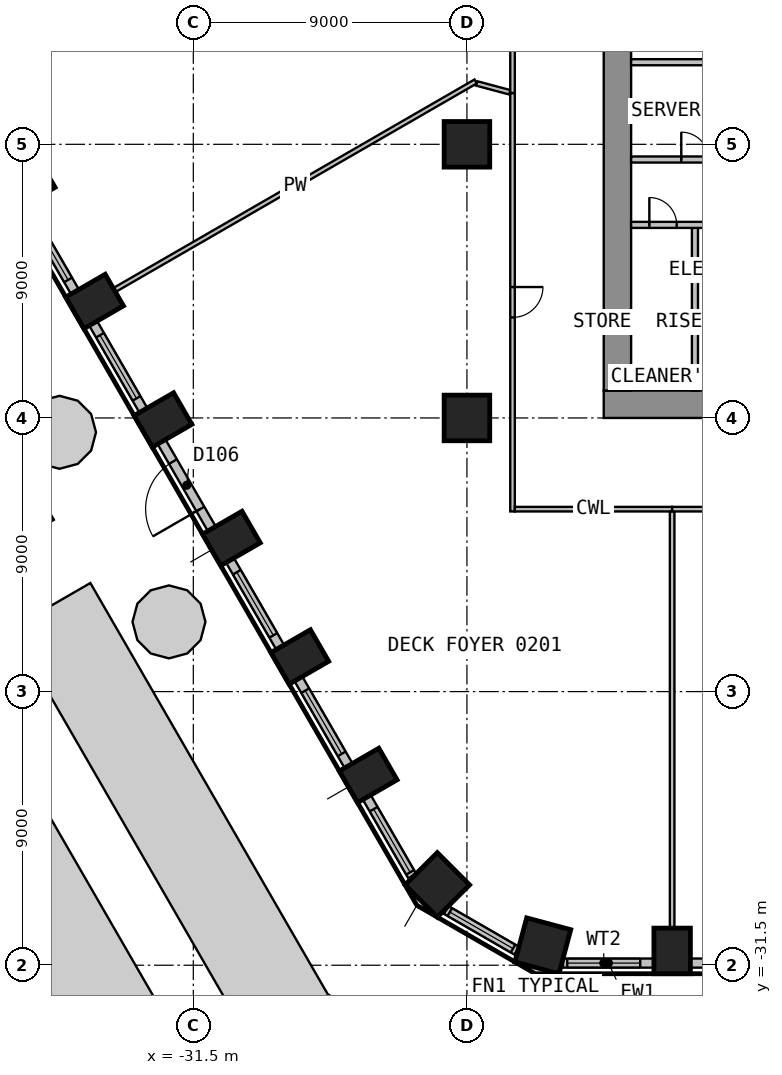
"""IFC4 building model, lengths in metres.
Left out: names, types, materials, properties, quantities, classifications, styles, units other than length and angle.
Written with IfcOpenShell. Run it as: python <this file> out.ifc"""

import sys

from ifc_helpers import new_model, si_unit, direction, frame, frame_2d, origin, origin_2d, place, context, subcontext, project, spatial, polyline, rectangle, circle, outline, extrude, element, fill, save


model = new_model("IFC4")
c1 = context("Model", 3, precision=1e-05, world=origin(), true_north=direction((0.0, 1.0)))
c2 = subcontext(c1, "Body", "Model", "MODEL_VIEW")
j1 = project(units=[si_unit("LENGTHUNIT", "METRE"), si_unit("PLANEANGLEUNIT", "RADIAN")], contexts=[c1])
p1 = place(None, origin())
s1 = spatial("IfcSite", under=j1, at=p1, CompositionType="ELEMENT")
p2 = place(p1, origin())
s2 = spatial("IfcBuilding", under=s1, at=p2, CompositionType="ELEMENT")
p3 = place(p2, frame((0.0, 0.0, 10.8)))
s3 = spatial("IfcBuildingStorey", under=s2, at=p3, CompositionType="ELEMENT", Elevation=10.8)
p4 = place(p3, frame((-20.004, -30.861, 0.0), z_axis=(0.0, 0.0, 1.0), x_axis=(0.965925826289, -0.258819045103, 0.0)))
e1 = element("IfcColumn", 1, at=p4, inside=s3, PredefinedType="COLUMN", context=c2, shape_type="SweptSolid", body=[
    extrude(rectangle(XDim=1.5, YDim=1.5, at=origin_2d()), origin(), (0.0, 0.0, 1.0), 4.4),
])
for number, where, z_axis, x_axis in (
    (2, (-15.75, -31.03, 0.0), (0.0, 0.0, 1.0), (1.0, 0.0, 0.0)),
    (3, (-36.998, -5.772, 0.0), (0.0, 0.0, 1.0), (0.5, -0.866, 0.0)),
    (4, (-34.748, -9.669, 0.0), (0.0, 0.0, 1.0), (0.5, -0.866, 0.0)),
    (5, (-32.498, -13.566, 0.0), (0.0, 0.0, 1.0), (0.5, -0.866, 0.0)),
    (6, (-30.248, -17.463, 0.0), (0.0, 0.0, 1.0), (0.5, -0.866, 0.0)),
    (7, (-27.998, -21.361, 0.0), (0.0, 0.0, 1.0), (0.5, -0.866, 0.0)),
    (8, (-25.748, -25.258, 0.0), (0.0, 0.0, 1.0), (0.5, -0.866, 0.0)),
):
    element("IfcColumn", number, at=place(p3, frame(where, z_axis=z_axis, x_axis=x_axis)), inside=s3, PredefinedType="COLUMN", context=c2, shape_type="SweptSolid", body=[
        extrude(rectangle(XDim=1.2, YDim=1.5, at=origin_2d()), origin(), (0.0, 0.0, 1.0), 4.4),
    ])
p5 = place(p3, frame((-23.475, -28.857, 0.0), z_axis=(0.0, 0.0, 1.0), x_axis=(0.707106781187, -0.707106781187, 0.0)))
e9 = element("IfcColumn", 9, at=p5, inside=s3, PredefinedType="COLUMN", context=c2, shape_type="SweptSolid", body=[
    extrude(rectangle(XDim=1.5, YDim=1.5, at=origin_2d()), origin(), (0.0, 0.0, 1.0), 4.4),
])
for number, where, z_axis, x_axis in (
    (10, (-22.5, -13.5, 0.0), (0.0, 0.0, 1.0), (1.0, 0.0, 0.0)),
    (11, (-22.5, -4.5, 0.0), (0.0, 0.0, 1.0), (1.0, 0.0, 0.0)),
):
    element("IfcColumn", number, at=place(p3, frame(where, z_axis=z_axis, x_axis=x_axis)), inside=s3, PredefinedType="COLUMN", context=c2, shape_type="SweptSolid", body=[
        extrude(circle(Radius=0.75, at=origin_2d()), origin(), (0.0, 0.0, 1.0), 4.4),
    ])
p6 = place(p3, frame((-19.339, -31.43, 0.0), z_axis=(0.0, 0.0, 1.0), x_axis=(1.0, 0.0, 0.0)))
e12 = element("IfcWall", 12, at=p6, inside=s3, PredefinedType="SOLIDWALL", context=c2, shape_type="SweptSolid", body=[
    extrude(rectangle(XDim=2.989, YDim=0.3, at=frame_2d((1.494, 0.0))), origin(), (0.0, 0.0, 1.0), 4.4),
])
p7 = place(p6, frame((0.139, 0.0, 0.9)))
e13 = element("IfcOpeningElement", 13, at=p7, cuts=e12, PredefinedType="OPENING", context=c2, shape_type="SweptSolid", body=[
    extrude(rectangle(XDim=2.4, YDim=3.0, at=frame_2d((1.2, 1.5))), frame((0.0, 0.16, 0.0), z_axis=(0.0, -1.0, 0.0), x_axis=(1.0, 0.0, 0.0)), (0.0, 0.0, 1.0), 0.32),
])
p8 = place(p3, frame((-15.149, -31.43, 0.0), z_axis=(0.0, 0.0, 1.0), x_axis=(1.0, 0.0, 0.0)))
e14 = element("IfcWall", 14, at=p8, inside=s3, PredefinedType="SOLIDWALL", context=c2, shape_type="SweptSolid", body=[
    extrude(rectangle(XDim=3.299, YDim=0.3, at=frame_2d((1.649, 0.0))), origin(), (0.0, 0.0, 1.0), 4.4),
])
p9 = place(p8, frame((0.449, 0.0, 0.9)))
e15 = element("IfcOpeningElement", 15, at=p9, cuts=e14, PredefinedType="OPENING", context=c2, shape_type="SweptSolid", body=[
    extrude(rectangle(XDim=2.4, YDim=3.0, at=frame_2d((1.2, 1.5))), frame((0.0, 0.16, 0.0), z_axis=(0.0, -1.0, 0.0), x_axis=(1.0, 0.0, 0.0)), (0.0, 0.0, 1.0), 0.32),
])
p10 = place(p3, frame((-37.044, -6.492, 0.0), z_axis=(0.0, 0.0, 1.0), x_axis=(0.499991515992, -0.866030301974, 0.0)))
e16 = element("IfcWall", 16, at=p10, inside=s3, PredefinedType="SOLIDWALL", context=c2, shape_type="SweptSolid", body=[
    extrude(rectangle(XDim=3.299, YDim=0.3, at=frame_2d((1.649, 0.0))), origin(), (0.0, 0.0, 1.0), 4.4),
])
p11 = place(p10, frame((0.449, 0.0, 0.9)))
e17 = element("IfcOpeningElement", 17, at=p11, cuts=e16, PredefinedType="OPENING", context=c2, shape_type="SweptSolid", body=[
    extrude(rectangle(XDim=2.4, YDim=3.0, at=frame_2d((1.2, 1.5))), frame((0.0, 0.16, 0.0), z_axis=(0.0, -1.0, 0.0), x_axis=(1.0, 0.0, 0.0)), (0.0, 0.0, 1.0), 0.32),
])
p12 = place(p3, frame((-34.794, -10.389, 0.0), z_axis=(0.0, 0.0, 1.0), x_axis=(0.499991515992, -0.866030301974, 0.0)))
e18 = element("IfcWall", 18, at=p12, inside=s3, PredefinedType="SOLIDWALL", context=c2, shape_type="SweptSolid", body=[
    extrude(rectangle(XDim=3.299, YDim=0.3, at=frame_2d((1.649, 0.0))), origin(), (0.0, 0.0, 1.0), 4.4),
])
p13 = place(p12, frame((0.449, 0.0, 0.9)))
e19 = element("IfcOpeningElement", 19, at=p13, cuts=e18, PredefinedType="OPENING", context=c2, shape_type="SweptSolid", body=[
    extrude(rectangle(XDim=2.4, YDim=3.0, at=frame_2d((1.2, 1.5))), frame((0.0, 0.16, 0.0), z_axis=(0.0, -1.0, 0.0), x_axis=(1.0, 0.0, 0.0)), (0.0, 0.0, 1.0), 0.32),
])
p14 = place(p3, frame((-30.894, -17.143, 0.0), z_axis=(0.0, 0.0, 1.0), x_axis=(-0.499991515992, 0.866030301974, 0.0)))
e20 = element("IfcWall", 20, at=p14, inside=s3, PredefinedType="SOLIDWALL", context=c2, shape_type="SweptSolid", body=[
    extrude(rectangle(XDim=3.299, YDim=0.3, at=frame_2d((1.649, 0.0))), origin(), (0.0, 0.0, 1.0), 4.4),
])
p15 = place(p14, frame((0.75, 0.0, 0.0)))
e21 = element("IfcOpeningElement", 21, at=p15, cuts=e20, PredefinedType="OPENING", context=c2, shape_type="SweptSolid", body=[
    extrude(rectangle(XDim=1.8, YDim=2.4, at=frame_2d((0.9, 1.2))), frame((0.0, 0.16, 0.0), z_axis=(0.0, -1.0, 0.0), x_axis=(1.0, 0.0, 0.0)), (0.0, 0.0, 1.0), 0.32),
])
p16 = place(p3, frame((-30.294, -18.184, 0.0), z_axis=(0.0, 0.0, 1.0), x_axis=(0.499991515992, -0.866030301974, 0.0)))
e22 = element("IfcWall", 22, at=p16, inside=s3, PredefinedType="SOLIDWALL", context=c2, shape_type="SweptSolid", body=[
    extrude(rectangle(XDim=3.299, YDim=0.3, at=frame_2d((1.649, 0.0))), origin(), (0.0, 0.0, 1.0), 4.4),
])
p17 = place(p16, frame((0.449, 0.0, 0.9)))
e23 = element("IfcOpeningElement", 23, at=p17, cuts=e22, PredefinedType="OPENING", context=c2, shape_type="SweptSolid", body=[
    extrude(rectangle(XDim=2.4, YDim=3.0, at=frame_2d((1.2, 1.5))), frame((0.0, 0.16, 0.0), z_axis=(0.0, -1.0, 0.0), x_axis=(1.0, 0.0, 0.0)), (0.0, 0.0, 1.0), 0.32),
])
p18 = place(p3, frame((-28.044, -22.081, 0.0), z_axis=(0.0, 0.0, 1.0), x_axis=(0.499991515992, -0.866030301974, 0.0)))
e24 = element("IfcWall", 24, at=p18, inside=s3, PredefinedType="SOLIDWALL", context=c2, shape_type="SweptSolid", body=[
    extrude(rectangle(XDim=3.299, YDim=0.3, at=frame_2d((1.649, 0.0))), origin(), (0.0, 0.0, 1.0), 4.4),
])
p19 = place(p18, frame((0.449, 0.0, 0.9)))
e25 = element("IfcOpeningElement", 25, at=p19, cuts=e24, PredefinedType="OPENING", context=c2, shape_type="SweptSolid", body=[
    extrude(rectangle(XDim=2.4, YDim=3.0, at=frame_2d((1.2, 1.5))), frame((0.0, 0.16, 0.0), z_axis=(0.0, -1.0, 0.0), x_axis=(1.0, 0.0, 0.0)), (0.0, 0.0, 1.0), 0.32),
])
p20 = place(p3, frame((-25.794, -25.978, 0.0), z_axis=(0.0, 0.0, 1.0), x_axis=(0.49999586137, -0.866027793211, 0.0)))
e26 = element("IfcWall", 26, at=p20, inside=s3, PredefinedType="SOLIDWALL", context=c2, shape_type="SweptSolid", body=[
    extrude(rectangle(XDim=2.989, YDim=0.3, at=frame_2d((1.494, 0.0))), origin(), (0.0, 0.0, 1.0), 4.4),
])
p21 = place(p20, frame((0.449, 0.0, 0.9)))
e27 = element("IfcOpeningElement", 27, at=p21, cuts=e26, PredefinedType="OPENING", context=c2, shape_type="SweptSolid", body=[
    extrude(rectangle(XDim=2.4, YDim=3.0, at=frame_2d((1.2, 1.5))), frame((0.0, 0.16, 0.0), z_axis=(0.0, -1.0, 0.0), x_axis=(1.0, 0.0, 0.0)), (0.0, 0.0, 1.0), 0.32),
])
p22 = place(p3, frame((-23.183, -29.682, 0.0), z_axis=(0.0, 0.0, 1.0), x_axis=(0.866001915448, -0.500040680786, 0.0)))
e28 = element("IfcWall", 28, at=p22, inside=s3, PredefinedType="SOLIDWALL", context=c2, shape_type="SweptSolid", body=[
    extrude(rectangle(XDim=2.678, YDim=0.3, at=frame_2d((1.339, 0.0))), origin(), (0.0, 0.0, 1.0), 4.4),
])
p23 = place(p22, frame((0.139, 0.0, 0.9)))
e29 = element("IfcOpeningElement", 29, at=p23, cuts=e28, PredefinedType="OPENING", context=c2, shape_type="SweptSolid", body=[
    extrude(rectangle(XDim=2.4, YDim=3.0, at=frame_2d((1.2, 1.5))), frame((0.0, 0.16, 0.0), z_axis=(0.0, -1.0, 0.0), x_axis=(1.0, 0.0, 0.0)), (0.0, 0.0, 1.0), 0.32),
])
p24 = place(p3, origin())
e30 = element("IfcWall", 30, at=p24, inside=s3, PredefinedType="SOLIDWALL", context=c2, shape_type="SweptSolid", body=[
    extrude(outline(polyline([(-12.4, -44.78), (-12.4, -40.78), (-22.662, -40.78), (-30.736, -36.118), (-39.216, -21.429), (-42.68, -23.429), (-33.664, -39.046), (-23.733, -44.78), (-12.4, -44.78)])), origin(), (0.0, 0.0, 1.0), 0.9),
])
p25 = place(p3, origin())
e31 = element("IfcWall", 31, at=p25, inside=s3, PredefinedType="SOLIDWALL", context=c2, shape_type="SweptSolid", body=[
    extrude(outline(polyline([(-12.4, -38.78), (-12.4, -35.78), (-21.322, -35.78), (-27.075, -32.458), (-34.886, -18.929), (-37.484, -20.429), (-29.271, -34.654), (-22.125, -38.78), (-12.4, -38.78)])), origin(), (0.0, 0.0, 1.0), 0.9),
])
p26 = place(p3, origin())
e32 = element("IfcWall", 32, at=p26, inside=s3, PredefinedType="SOLIDWALL", context=c2, shape_type="SweptSolid", body=[
    extrude(outline(polyline([(-46.897, -4.125), (-38.684, -18.351), (-36.086, -16.851), (-43.897, -3.322), (-43.897, 3.322), (-36.086, 16.851), (-38.684, 18.351), (-46.897, 4.125), (-46.897, -4.125)])), origin(), (0.0, 0.0, 1.0), 0.9),
])
p27 = place(p3, origin())
e33 = element("IfcWall", 33, at=p27, inside=s3, PredefinedType="SOLIDWALL", context=c2, shape_type="SweptSolid", body=[
    extrude(outline(polyline([(-34.701, -13.972), (-34.861, -14.572), (-35.301, -15.011), (-35.901, -15.172), (-36.5, -15.011), (-36.94, -14.572), (-37.101, -13.972), (-36.94, -13.372), (-36.5, -12.933), (-35.901, -12.772), (-35.301, -12.933), (-34.861, -13.372), (-34.701, -13.972)])), origin(), (0.0, 0.0, 1.0), 0.6),
])
p28 = place(p3, origin())
e34 = element("IfcWall", 34, at=p28, inside=s3, PredefinedType="SOLIDWALL", context=c2, shape_type="SweptSolid", body=[
    extrude(outline(polyline([(-31.101, -20.208), (-31.261, -20.808), (-31.701, -21.247), (-32.301, -21.408), (-32.901, -21.247), (-33.34, -20.808), (-33.5, -20.208), (-33.34, -19.608), (-32.901, -19.168), (-32.301, -19.008), (-31.701, -19.168), (-31.261, -19.608), (-31.101, -20.208)])), origin(), (0.0, 0.0, 1.0), 0.6),
])
p29 = place(p3, frame((-18.0, -13.05, 0.0), z_axis=(0.0, 0.0, 1.0), x_axis=(1.0, 0.0, 0.0)))
e35 = element("IfcWall", 35, at=p29, inside=s3, PredefinedType="SHEAR", context=c2, shape_type="SweptSolid", body=[
    extrude(rectangle(XDim=36.0, YDim=0.9, at=frame_2d((18.0, 0.0))), origin(), (0.0, 0.0, 1.0), 4.4),
])
p30 = place(p29, frame((16.8, 0.0, 0.0)))
e36 = element("IfcOpeningElement", 36, at=p30, cuts=e35, PredefinedType="OPENING", context=c2, shape_type="SweptSolid", body=[
    extrude(rectangle(XDim=2.4, YDim=2.1, at=frame_2d((1.2, 1.05))), frame((0.0, 0.46, 0.0), z_axis=(0.0, -1.0, 0.0), x_axis=(1.0, 0.0, 0.0)), (0.0, 0.0, 1.0), 0.92),
])
p31 = place(p29, frame((5.55, 0.0, 0.0)))
e37 = element("IfcOpeningElement", 37, at=p31, cuts=e35, PredefinedType="OPENING", context=c2, shape_type="SweptSolid", body=[
    extrude(rectangle(XDim=1.2, YDim=2.1, at=frame_2d((0.6, 1.05))), frame((0.0, 0.46, 0.0), z_axis=(0.0, -1.0, 0.0), x_axis=(1.0, 0.0, 0.0)), (0.0, 0.0, 1.0), 0.92),
])
p32 = place(p29, frame((29.25, 0.0, 0.0)))
e38 = element("IfcOpeningElement", 38, at=p32, cuts=e35, PredefinedType="OPENING", context=c2, shape_type="SweptSolid", body=[
    extrude(rectangle(XDim=1.2, YDim=2.1, at=frame_2d((0.6, 1.05))), frame((0.0, 0.46, 0.0), z_axis=(0.0, -1.0, 0.0), x_axis=(1.0, 0.0, 0.0)), (0.0, 0.0, 1.0), 0.92),
])
p33 = place(p3, frame((-17.55, -12.6, 0.0), z_axis=(0.0, 0.0, 1.0), x_axis=(0.0, 1.0, 0.0)))
e39 = element("IfcWall", 39, at=p33, inside=s3, PredefinedType="SHEAR", context=c2, shape_type="SweptSolid", body=[
    extrude(rectangle(XDim=25.2, YDim=0.9, at=frame_2d((12.6, 0.0))), origin(), (0.0, 0.0, 1.0), 4.4),
])
p34 = place(p33, frame((11.4, 0.0, 0.0)))
e40 = element("IfcOpeningElement", 40, at=p34, cuts=e39, PredefinedType="OPENING", context=c2, shape_type="SweptSolid", body=[
    extrude(rectangle(XDim=2.4, YDim=2.1, at=frame_2d((1.2, 1.05))), frame((0.0, 0.46, 0.0), z_axis=(0.0, -1.0, 0.0), x_axis=(1.0, 0.0, 0.0)), (0.0, 0.0, 1.0), 0.92),
])
p35 = place(p3, frame((-15.0, -12.6, 0.0), z_axis=(0.0, 0.0, 1.0), x_axis=(0.0, 1.0, 0.0)))
e41 = element("IfcWall", 41, at=p35, inside=s3, PredefinedType="PARTITIONING", context=c2, shape_type="SweptSolid", body=[
    extrude(rectangle(XDim=5.45, YDim=0.2, at=frame_2d((2.725, 0.0))), origin(), (0.0, 0.0, 1.0), 4.4),
])
p36 = place(p3, frame((-17.1, -7.15, 0.0), z_axis=(0.0, 0.0, 1.0), x_axis=(1.0, 0.0, 0.0)))
e42 = element("IfcWall", 42, at=p36, inside=s3, PredefinedType="PARTITIONING", context=c2, shape_type="SweptSolid", body=[
    extrude(rectangle(XDim=4.2, YDim=0.2, at=frame_2d((2.1, 0.0))), origin(), (0.0, 0.0, 1.0), 4.4),
])
p37 = place(p36, frame((0.6, 0.0, 0.0)))
e43 = element("IfcOpeningElement", 43, at=p37, cuts=e42, PredefinedType="OPENING", context=c2, shape_type="SweptSolid", body=[
    extrude(rectangle(XDim=0.9, YDim=2.1, at=frame_2d((0.45, 1.05))), frame((0.0, 0.11, 0.0), z_axis=(0.0, -1.0, 0.0), x_axis=(1.0, 0.0, 0.0)), (0.0, 0.0, 1.0), 0.22),
])
p38 = place(p36, frame((2.7, 0.0, 0.0)))
e44 = element("IfcOpeningElement", 44, at=p38, cuts=e42, PredefinedType="OPENING", context=c2, shape_type="SweptSolid", body=[
    extrude(rectangle(XDim=0.9, YDim=2.1, at=frame_2d((0.45, 1.05))), frame((0.0, 0.11, 0.0), z_axis=(0.0, -1.0, 0.0), x_axis=(1.0, 0.0, 0.0)), (0.0, 0.0, 1.0), 0.22),
])
p39 = place(p3, frame((-17.1, -5.0, 0.0), z_axis=(0.0, 0.0, 1.0), x_axis=(1.0, 0.0, 0.0)))
e45 = element("IfcWall", 45, at=p39, inside=s3, PredefinedType="PARTITIONING", context=c2, shape_type="SweptSolid", body=[
    extrude(rectangle(XDim=4.2, YDim=0.2, at=frame_2d((2.1, 0.0))), origin(), (0.0, 0.0, 1.0), 4.4),
])
p40 = place(p39, frame((1.65, 0.0, 0.0)))
e46 = element("IfcOpeningElement", 46, at=p40, cuts=e45, PredefinedType="OPENING", context=c2, shape_type="SweptSolid", body=[
    extrude(rectangle(XDim=0.9, YDim=2.1, at=frame_2d((0.45, 1.05))), frame((0.0, 0.11, 0.0), z_axis=(0.0, -1.0, 0.0), x_axis=(1.0, 0.0, 0.0)), (0.0, 0.0, 1.0), 0.22),
])
p41 = place(p3, frame((-17.1, -1.8, 0.0), z_axis=(0.0, 0.0, 1.0), x_axis=(1.0, 0.0, 0.0)))
e47 = element("IfcWall", 47, at=p41, inside=s3, PredefinedType="PARTITIONING", context=c2, shape_type="SweptSolid", body=[
    extrude(rectangle(XDim=4.2, YDim=0.2, at=frame_2d((2.1, 0.0))), origin(), (0.0, 0.0, 1.0), 4.4),
])
p42 = place(p3, frame((-22.214, -2.434, 0.0), z_axis=(0.0, 0.0, 1.0), x_axis=(-0.866046135423, -0.499964090029, 0.0)))
e48 = element("IfcWall", 48, at=p42, inside=s3, PredefinedType="PARTITIONING", context=c2, shape_type="SweptSolid", body=[
    extrude(rectangle(XDim=13.702, YDim=0.15, at=frame_2d((6.851, 0.0))), origin(), (0.0, 0.0, 1.0), 4.4),
])
p43 = place(p3, frame((-21.092, -2.788, 0.0), z_axis=(0.0, 0.0, 1.0), x_axis=(-0.966065265568, 0.25829808877, 0.0)))
e49 = element("IfcWall", 49, at=p43, inside=s3, PredefinedType="PARTITIONING", context=c2, shape_type="SweptSolid", body=[
    extrude(rectangle(XDim=1.124, YDim=0.15, at=frame_2d((0.562, 0.0))), origin(), (0.0, 0.0, 1.0), 4.4),
])
p44 = place(p3, frame((-21.0, -2.813, 0.0), z_axis=(0.0, 0.0, 1.0), x_axis=(0.0, -1.0, 0.0)))
e50 = element("IfcWall", 50, at=p44, inside=s3, PredefinedType="PARTITIONING", context=c2, shape_type="SweptSolid", body=[
    extrude(rectangle(XDim=13.762, YDim=0.15, at=frame_2d((6.881, 0.0))), origin(), (0.0, 0.0, 1.0), 4.4),
])
p45 = place(p44, frame((6.381, 0.0, 0.0)))
e51 = element("IfcOpeningElement", 51, at=p45, cuts=e50, PredefinedType="OPENING", context=c2, shape_type="SweptSolid", body=[
    extrude(rectangle(XDim=1.0, YDim=2.1, at=frame_2d((0.5, 1.05))), frame((0.0, 0.085, 0.0), z_axis=(0.0, -1.0, 0.0), x_axis=(1.0, 0.0, 0.0)), (0.0, 0.0, 1.0), 0.17),
])
p46 = place(p3, frame((-20.925, -16.5, 0.0), z_axis=(0.0, 0.0, 1.0), x_axis=(1.0, 0.0, 0.0)))
e52 = element("IfcWall", 52, at=p46, inside=s3, PredefinedType="PARTITIONING", context=c2, shape_type="SweptSolid", body=[
    extrude(rectangle(XDim=5.175, YDim=0.15, at=frame_2d((2.587, 0.0))), origin(), (0.0, 0.0, 1.0), 4.4),
])
p47 = place(p3, frame((-21.0, 6.928, 0.0), z_axis=(0.0, 0.0, 1.0), x_axis=(0.0, -1.0, 0.0)))
e53 = element("IfcWall", 53, at=p47, inside=s3, PredefinedType="PARTITIONING", context=c2, shape_type="SweptSolid", body=[
    extrude(rectangle(XDim=9.741, YDim=0.15, at=frame_2d((4.871, 0.0))), origin(), (0.0, 0.0, 1.0), 4.4),
])
p48 = place(p47, frame((4.371, 0.0, 0.0)))
e54 = element("IfcOpeningElement", 54, at=p48, cuts=e53, PredefinedType="OPENING", context=c2, shape_type="SweptSolid", body=[
    extrude(rectangle(XDim=1.0, YDim=2.1, at=frame_2d((0.5, 1.05))), frame((0.0, 0.085, 0.0), z_axis=(0.0, -1.0, 0.0), x_axis=(1.0, 0.0, 0.0)), (0.0, 0.0, 1.0), 0.17),
])
p49 = place(p3, frame((-15.75, -16.575, 0.0), z_axis=(0.0, 0.0, 1.0), x_axis=(0.0, -1.0, 0.0)))
e55 = element("IfcWall", 55, at=p49, inside=s3, PredefinedType="PARTITIONING", context=c2, shape_type="SweptSolid", body=[
    extrude(rectangle(XDim=13.685, YDim=0.15, at=frame_2d((6.842, 0.0))), origin(), (0.0, 0.0, 1.0), 4.4),
])
p50 = place(p3, frame((-15.75, -16.5, 0.0), z_axis=(0.0, 0.0, 1.0), x_axis=(1.0, 0.0, 0.0)))
e56 = element("IfcWall", 56, at=p50, inside=s3, PredefinedType="PARTITIONING", context=c2, shape_type="SweptSolid", body=[
    extrude(rectangle(XDim=13.575, YDim=0.15, at=frame_2d((6.788, 0.0))), origin(), (0.0, 0.0, 1.0), 4.4),
])
p51 = place(p7, origin())
e57 = element("IfcWindow", 57, at=p51, inside=s3, PartitioningType="SINGLE_PANEL", PredefinedType="WINDOW", context=c2, shape_type="SweptSolid", body=[
    extrude(rectangle(XDim=2.4, YDim=3.0, at=frame_2d((1.2, 1.5))), frame((0.0, 0.03, 0.0), z_axis=(0.0, -1.0, 0.0), x_axis=(1.0, 0.0, 0.0)), (0.0, 0.0, 1.0), 0.06),
])
fill(e13, e57)
p52 = place(p11, origin())
e58 = element("IfcWindow", 58, at=p52, inside=s3, PartitioningType="SINGLE_PANEL", PredefinedType="WINDOW", context=c2, shape_type="SweptSolid", body=[
    extrude(rectangle(XDim=2.4, YDim=3.0, at=frame_2d((1.2, 1.5))), frame((0.0, 0.03, 0.0), z_axis=(0.0, -1.0, 0.0), x_axis=(1.0, 0.0, 0.0)), (0.0, 0.0, 1.0), 0.06),
])
fill(e17, e58)
p53 = place(p13, origin())
e59 = element("IfcWindow", 59, at=p53, inside=s3, PartitioningType="SINGLE_PANEL", PredefinedType="WINDOW", context=c2, shape_type="SweptSolid", body=[
    extrude(rectangle(XDim=2.4, YDim=3.0, at=frame_2d((1.2, 1.5))), frame((0.0, 0.03, 0.0), z_axis=(0.0, -1.0, 0.0), x_axis=(1.0, 0.0, 0.0)), (0.0, 0.0, 1.0), 0.06),
])
fill(e19, e59)
p54 = place(p15, origin())
e60 = element("IfcDoor", 60, at=p54, inside=s3, OperationType="DOUBLE_DOOR_SINGLE_SWING", PredefinedType="DOOR", context=c2, shape_type="SweptSolid", body=[
    extrude(rectangle(XDim=1.8, YDim=2.4, at=frame_2d((0.9, 1.2))), frame((0.0, 0.025, 0.0), z_axis=(0.0, -1.0, 0.0), x_axis=(1.0, 0.0, 0.0)), (0.0, 0.0, 1.0), 0.05),
])
fill(e21, e60)
p55 = place(p17, origin())
e61 = element("IfcWindow", 61, at=p55, inside=s3, PartitioningType="SINGLE_PANEL", PredefinedType="WINDOW", context=c2, shape_type="SweptSolid", body=[
    extrude(rectangle(XDim=2.4, YDim=3.0, at=frame_2d((1.2, 1.5))), frame((0.0, 0.03, 0.0), z_axis=(0.0, -1.0, 0.0), x_axis=(1.0, 0.0, 0.0)), (0.0, 0.0, 1.0), 0.06),
])
fill(e23, e61)
p56 = place(p19, origin())
e62 = element("IfcWindow", 62, at=p56, inside=s3, PartitioningType="SINGLE_PANEL", PredefinedType="WINDOW", context=c2, shape_type="SweptSolid", body=[
    extrude(rectangle(XDim=2.4, YDim=3.0, at=frame_2d((1.2, 1.5))), frame((0.0, 0.03, 0.0), z_axis=(0.0, -1.0, 0.0), x_axis=(1.0, 0.0, 0.0)), (0.0, 0.0, 1.0), 0.06),
])
fill(e25, e62)
p57 = place(p21, origin())
e63 = element("IfcWindow", 63, at=p57, inside=s3, PartitioningType="SINGLE_PANEL", PredefinedType="WINDOW", context=c2, shape_type="SweptSolid", body=[
    extrude(rectangle(XDim=2.4, YDim=3.0, at=frame_2d((1.2, 1.5))), frame((0.0, 0.03, 0.0), z_axis=(0.0, -1.0, 0.0), x_axis=(1.0, 0.0, 0.0)), (0.0, 0.0, 1.0), 0.06),
])
fill(e27, e63)
p58 = place(p23, origin())
e64 = element("IfcWindow", 64, at=p58, inside=s3, PartitioningType="SINGLE_PANEL", PredefinedType="WINDOW", context=c2, shape_type="SweptSolid", body=[
    extrude(rectangle(XDim=2.4, YDim=3.0, at=frame_2d((1.2, 1.5))), frame((0.0, 0.03, 0.0), z_axis=(0.0, -1.0, 0.0), x_axis=(1.0, 0.0, 0.0)), (0.0, 0.0, 1.0), 0.06),
])
fill(e29, e64)
p59 = place(p37, origin())
e65 = element("IfcDoor", 65, at=p59, inside=s3, OperationType="SINGLE_SWING_LEFT", PredefinedType="DOOR", context=c2, shape_type="SweptSolid", body=[
    extrude(rectangle(XDim=0.9, YDim=2.1, at=frame_2d((0.45, 1.05))), frame((0.0, 0.025, 0.0), z_axis=(0.0, -1.0, 0.0), x_axis=(1.0, 0.0, 0.0)), (0.0, 0.0, 1.0), 0.05),
])
fill(e43, e65)
p60 = place(p40, origin())
e66 = element("IfcDoor", 66, at=p60, inside=s3, OperationType="SINGLE_SWING_LEFT", PredefinedType="DOOR", context=c2, shape_type="SweptSolid", body=[
    extrude(rectangle(XDim=0.9, YDim=2.1, at=frame_2d((0.45, 1.05))), frame((0.0, 0.025, 0.0), z_axis=(0.0, -1.0, 0.0), x_axis=(1.0, 0.0, 0.0)), (0.0, 0.0, 1.0), 0.05),
])
fill(e46, e66)
p61 = place(p45, origin())
e67 = element("IfcDoor", 67, at=p61, inside=s3, OperationType="SINGLE_SWING_LEFT", PredefinedType="DOOR", context=c2, shape_type="SweptSolid", body=[
    extrude(rectangle(XDim=1.0, YDim=2.1, at=frame_2d((0.5, 1.05))), frame((0.0, 0.025, 0.0), z_axis=(0.0, -1.0, 0.0), x_axis=(1.0, 0.0, 0.0)), (0.0, 0.0, 1.0), 0.05),
])
fill(e51, e67)
save(model, sys.argv[1])
